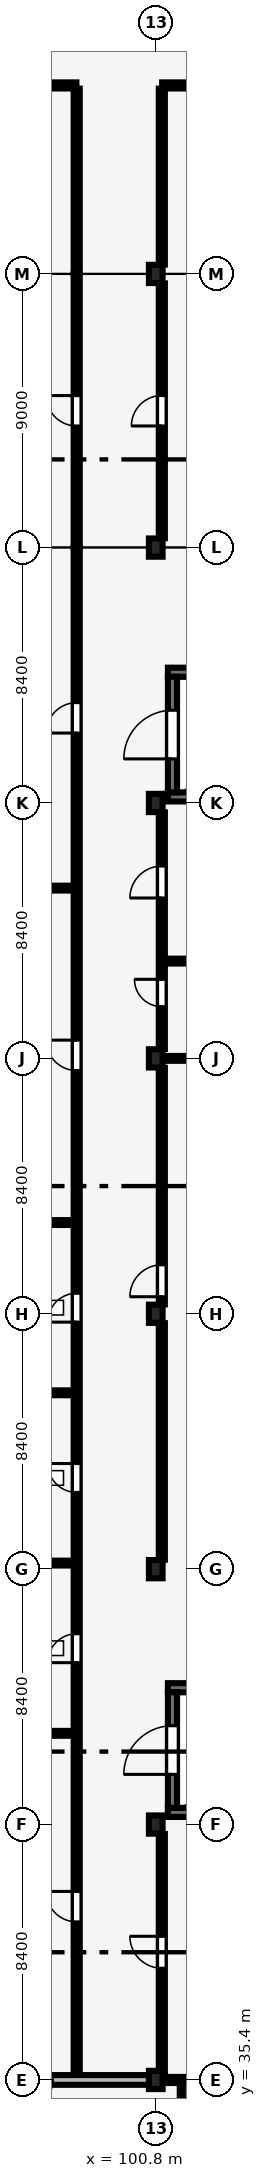
"""IFC4 building model, lengths in metres.
Left out: names, types, materials, properties, quantities, classifications, styles, units other than length and angle.
Written with IfcOpenShell. Run it as: python <this file> out.ifc"""

import sys

from ifc_helpers import new_model, si_unit, direction, frame, frame_2d, origin, origin_2d, place, context, subcontext, project, spatial, rectangle, extrude, element, fill, save


model = new_model("IFC4")
c1 = context("Model", 3, precision=1e-05, world=origin(), true_north=direction((0.0, 1.0)))
c2 = subcontext(c1, "Body", "Model", "MODEL_VIEW")
j1 = project(units=[si_unit("LENGTHUNIT", "METRE"), si_unit("PLANEANGLEUNIT", "RADIAN")], contexts=[c1])
p1 = place(None, origin())
s1 = spatial("IfcSite", under=j1, at=p1, CompositionType="ELEMENT")
p2 = place(p1, origin())
s2 = spatial("IfcBuilding", under=s1, at=p2, CompositionType="ELEMENT")
p3 = place(p2, frame((0.0, 0.0, 13.2)))
s3 = spatial("IfcBuildingStorey", under=s2, at=p3, CompositionType="ELEMENT", Elevation=13.2)
for number, where, z_axis, x_axis in (
    (1, (100.8, 35.4, 0.0), (0.0, 0.0, 1.0), (1.0, 0.0, 0.0)),
    (2, (100.8, 43.8, 0.0), (0.0, 0.0, 1.0), (1.0, 0.0, 0.0)),
    (3, (100.8, 52.2, 0.0), (0.0, 0.0, 1.0), (1.0, 0.0, 0.0)),
    (4, (100.8, 60.6, 0.0), (0.0, 0.0, 1.0), (1.0, 0.0, 0.0)),
    (5, (100.8, 69.0, 0.0), (0.0, 0.0, 1.0), (1.0, 0.0, 0.0)),
    (6, (100.8, 77.4, 0.0), (0.0, 0.0, 1.0), (1.0, 0.0, 0.0)),
    (7, (100.8, 85.8, 0.0), (0.0, 0.0, 1.0), (1.0, 0.0, 0.0)),
    (8, (100.8, 94.8, 0.0), (0.0, 0.0, 1.0), (1.0, 0.0, 0.0)),
):
    element("IfcColumn", number, at=place(p3, frame(where, z_axis=z_axis, x_axis=x_axis)), inside=s3, PredefinedType="COLUMN", context=c2, shape_type="SweptSolid", body=[
        extrude(rectangle(XDim=0.45, YDim=0.6, at=origin_2d()), origin(), (0.0, 0.0, 1.0), 4.2),
    ])
p4 = place(p3, frame((92.6, 35.4, 0.0), z_axis=(0.0, 0.0, 1.0), x_axis=(1.0, 0.0, 0.0)))
e9 = element("IfcWall", 9, at=p4, inside=s3, PredefinedType="SOLIDWALL", context=c2, shape_type="SweptSolid", body=[
    extrude(rectangle(XDim=8.0, YDim=0.32, at=frame_2d((4.0, 0.0))), origin(), (0.0, 0.0, 1.0), 3.43),
])
p5 = place(p4, frame((4.8, 0.0, 0.0), z_axis=(0.0, 0.0, 1.0), x_axis=(-1.0, 0.0, 0.0)))
e10 = element("IfcOpeningElement", 10, at=p5, cuts=e9, PredefinedType="OPENING", context=c2, shape_type="SweptSolid", body=[
    extrude(rectangle(XDim=1.6, YDim=2.3, at=frame_2d((0.8, 1.15))), frame((0.0, 0.17, 0.0), z_axis=(0.0, -1.0, 0.0), x_axis=(1.0, 0.0, 0.0)), (0.0, 0.0, 1.0), 0.34),
])
p6 = place(p4, frame((0.45, 0.0, 0.95)))
e11 = element("IfcOpeningElement", 11, at=p6, cuts=e9, PredefinedType="OPENING", context=c2, shape_type="SweptSolid", body=[
    extrude(rectangle(XDim=1.68, YDim=1.8, at=frame_2d((0.84, 0.9))), frame((0.0, 0.17, 0.0), z_axis=(0.0, -1.0, 0.0), x_axis=(1.0, 0.0, 0.0)), (0.0, 0.0, 1.0), 0.34),
])
for number, where, z_axis, x_axis in (
    (12, (101.2, 44.2, 0.0), (0.0, 0.0, 1.0), (1.0, 0.0, 0.0)),
    (13, (101.2, 48.3, 0.0), (0.0, 0.0, 1.0), (1.0, 0.0, 0.0)),
):
    element("IfcWall", number, at=place(p3, frame(where, z_axis=z_axis, x_axis=x_axis)), inside=s3, PredefinedType="SHEAR", context=c2, shape_type="SweptSolid", body=[
        extrude(rectangle(XDim=7.6, YDim=0.3, at=frame_2d((3.8, 0.0))), origin(), (0.0, 0.0, 1.0), 4.025),
    ])
p7 = place(p3, frame((101.35, 44.35, 0.0), z_axis=(0.0, 0.0, 1.0), x_axis=(0.0, 1.0, 0.0)))
e14 = element("IfcWall", 14, at=p7, inside=s3, PredefinedType="SHEAR", context=c2, shape_type="SweptSolid", body=[
    extrude(rectangle(XDim=3.8, YDim=0.3, at=frame_2d((1.9, 0.0))), origin(), (0.0, 0.0, 1.0), 4.025),
])
p8 = place(p7, frame((1.1, 0.0, 0.0)))
e15 = element("IfcOpeningElement", 15, at=p8, cuts=e14, PredefinedType="OPENING", context=c2, shape_type="SweptSolid", body=[
    extrude(rectangle(XDim=1.6, YDim=2.2, at=frame_2d((0.8, 1.1))), frame((0.0, 0.16, 0.0), z_axis=(0.0, -1.0, 0.0), x_axis=(1.0, 0.0, 0.0)), (0.0, 0.0, 1.0), 0.32),
])
for number, where, z_axis, x_axis in (
    (16, (101.2, 77.6, 0.0), (0.0, 0.0, 1.0), (1.0, 0.0, 0.0)),
    (17, (101.2, 81.7, 0.0), (0.0, 0.0, 1.0), (1.0, 0.0, 0.0)),
):
    element("IfcWall", number, at=place(p3, frame(where, z_axis=z_axis, x_axis=x_axis)), inside=s3, PredefinedType="SHEAR", context=c2, shape_type="SweptSolid", body=[
        extrude(rectangle(XDim=7.6, YDim=0.3, at=frame_2d((3.8, 0.0))), origin(), (0.0, 0.0, 1.0), 4.025),
    ])
p9 = place(p3, frame((101.35, 77.75, 0.0), z_axis=(0.0, 0.0, 1.0), x_axis=(0.0, 1.0, 0.0)))
e18 = element("IfcWall", 18, at=p9, inside=s3, PredefinedType="SHEAR", context=c2, shape_type="SweptSolid", body=[
    extrude(rectangle(XDim=3.8, YDim=0.3, at=frame_2d((1.9, 0.0))), origin(), (0.0, 0.0, 1.0), 4.025),
])
p10 = place(p9, frame((1.1, 0.0, 0.0)))
e19 = element("IfcOpeningElement", 19, at=p10, cuts=e18, PredefinedType="OPENING", context=c2, shape_type="SweptSolid", body=[
    extrude(rectangle(XDim=1.6, YDim=2.2, at=frame_2d((0.8, 1.1))), frame((0.0, 0.16, 0.0), z_axis=(0.0, -1.0, 0.0), x_axis=(1.0, 0.0, 0.0)), (0.0, 0.0, 1.0), 0.32),
])
p11 = place(p3, frame((62.31, 101.0, 0.0), z_axis=(0.0, 0.0, 1.0), x_axis=(1.0, 0.0, 0.0)))
e20 = element("IfcWall", 20, at=p11, inside=s3, PredefinedType="PARTITIONING", context=c2, shape_type="SweptSolid", body=[
    extrude(rectangle(XDim=35.88, YDim=0.2, at=frame_2d((17.94, 0.0))), origin(), (0.0, 0.0, 1.0), 3.451),
])
p12 = place(p11, frame((8.49, 0.0, 0.0)))
e21 = element("IfcOpeningElement", 21, at=p12, cuts=e20, PredefinedType="OPENING", context=c2, shape_type="SweptSolid", body=[
    extrude(rectangle(XDim=0.9, YDim=2.1, at=frame_2d((0.45, 1.05))), frame((0.0, 0.11, 0.0), z_axis=(0.0, -1.0, 0.0), x_axis=(1.0, 0.0, 0.0)), (0.0, 0.0, 1.0), 0.22),
])
p13 = place(p11, frame((26.44, 0.0, 0.0)))
e22 = element("IfcOpeningElement", 22, at=p13, cuts=e20, PredefinedType="OPENING", context=c2, shape_type="SweptSolid", body=[
    extrude(rectangle(XDim=0.9, YDim=2.1, at=frame_2d((0.45, 1.05))), frame((0.0, 0.11, 0.0), z_axis=(0.0, -1.0, 0.0), x_axis=(1.0, 0.0, 0.0)), (0.0, 0.0, 1.0), 0.22),
])
p14 = place(p3, frame((98.2, 94.81, 0.0), z_axis=(0.0, 0.0, 1.0), x_axis=(0.0, 1.0, 0.0)))
e23 = element("IfcWall", 23, at=p14, inside=s3, PredefinedType="PARTITIONING", context=c2, shape_type="SweptSolid", body=[
    extrude(rectangle(XDim=6.085, YDim=0.2, at=frame_2d((3.042, 0.0))), origin(), (0.0, 0.0, 1.0), 3.9),
])
p15 = place(p3, frame((101.01, 101.0, 0.0), z_axis=(0.0, 0.0, 1.0), x_axis=(1.0, 0.0, 0.0)))
e24 = element("IfcWall", 24, at=p15, inside=s3, PredefinedType="PARTITIONING", context=c2, shape_type="SweptSolid", body=[
    extrude(rectangle(XDim=16.395, YDim=0.2, at=frame_2d((8.198, 0.0))), origin(), (0.0, 0.0, 1.0), 3.451),
])
p16 = place(p15, frame((7.84, 0.0, 0.0)))
e25 = element("IfcOpeningElement", 25, at=p16, cuts=e24, PredefinedType="OPENING", context=c2, shape_type="SweptSolid", body=[
    extrude(rectangle(XDim=0.9, YDim=2.1, at=frame_2d((0.45, 1.05))), frame((0.0, 0.11, 0.0), z_axis=(0.0, -1.0, 0.0), x_axis=(1.0, 0.0, 0.0)), (0.0, 0.0, 1.0), 0.22),
])
p17 = place(p3, frame((101.0, 95.11, 0.0), z_axis=(0.0, 0.0, 1.0), x_axis=(0.0, 1.0, 0.0)))
e26 = element("IfcWall", 26, at=p17, inside=s3, PredefinedType="PARTITIONING", context=c2, shape_type="SweptSolid", body=[
    extrude(rectangle(XDim=5.785, YDim=0.2, at=frame_2d((2.893, 0.0))), origin(), (0.0, 0.0, 1.0), 3.48),
])
p18 = place(p3, frame((98.2, 85.81, 0.0), z_axis=(0.0, 0.0, 1.0), x_axis=(0.0, 1.0, 0.0)))
e27 = element("IfcWall", 27, at=p18, inside=s3, PredefinedType="PARTITIONING", context=c2, shape_type="SweptSolid", body=[
    extrude(rectangle(XDim=8.98, YDim=0.2, at=frame_2d((4.49, 0.0))), origin(), (0.0, 0.0, 1.0), 3.9),
])
p19 = place(p18, frame((3.99, 0.0, 0.0)))
e28 = element("IfcOpeningElement", 28, at=p19, cuts=e27, PredefinedType="OPENING", context=c2, shape_type="SweptSolid", body=[
    extrude(rectangle(XDim=1.0, YDim=2.15, at=frame_2d((0.5, 1.075))), frame((0.0, 0.11, 0.0), z_axis=(0.0, -1.0, 0.0), x_axis=(1.0, 0.0, 0.0)), (0.0, 0.0, 1.0), 0.22),
])
p20 = place(p3, frame((101.0, 86.11, 0.0), z_axis=(0.0, 0.0, 1.0), x_axis=(0.0, 1.0, 0.0)))
e29 = element("IfcWall", 29, at=p20, inside=s3, PredefinedType="PARTITIONING", context=c2, shape_type="SweptSolid", body=[
    extrude(rectangle(XDim=8.38, YDim=0.2, at=frame_2d((4.19, 0.0))), origin(), (0.0, 0.0, 1.0), 3.43),
])
p21 = place(p20, frame((3.69, 0.0, 0.0)))
e30 = element("IfcOpeningElement", 30, at=p21, cuts=e29, PredefinedType="OPENING", context=c2, shape_type="SweptSolid", body=[
    extrude(rectangle(XDim=1.0, YDim=2.15, at=frame_2d((0.5, 1.075))), frame((0.0, 0.11, 0.0), z_axis=(0.0, -1.0, 0.0), x_axis=(1.0, 0.0, 0.0)), (0.0, 0.0, 1.0), 0.22),
])
p22 = place(p3, frame((92.525, 46.8, 0.0), z_axis=(0.0, 0.0, 1.0), x_axis=(1.0, 0.0, 0.0)))
e31 = element("IfcWall", 31, at=p22, inside=s3, PredefinedType="PARTITIONING", context=c2, shape_type="SweptSolid", body=[
    extrude(rectangle(XDim=5.57, YDim=0.16, at=frame_2d((2.785, 0.0))), origin(), (0.0, 0.0, 1.0), 3.46),
])
p23 = place(p3, frame((92.525, 52.4, 0.0), z_axis=(0.0, 0.0, 1.0), x_axis=(1.0, 0.0, 0.0)))
e32 = element("IfcWall", 32, at=p23, inside=s3, PredefinedType="PARTITIONING", context=c2, shape_type="SweptSolid", body=[
    extrude(rectangle(XDim=5.57, YDim=0.16, at=frame_2d((2.785, 0.0))), origin(), (0.0, 0.0, 1.0), 3.14),
])
for number, where, z_axis, x_axis in (
    (33, (92.525, 58.0, 0.0), (0.0, 0.0, 1.0), (1.0, 0.0, 0.0)),
    (34, (92.525, 63.6, 0.0), (0.0, 0.0, 1.0), (1.0, 0.0, 0.0)),
    (35, (92.525, 74.6, 0.0), (0.0, 0.0, 1.0), (1.0, 0.0, 0.0)),
):
    element("IfcWall", number, at=place(p3, frame(where, z_axis=z_axis, x_axis=x_axis)), inside=s3, PredefinedType="PARTITIONING", context=c2, shape_type="SweptSolid", body=[
        extrude(rectangle(XDim=5.57, YDim=0.16, at=frame_2d((2.785, 0.0))), origin(), (0.0, 0.0, 1.0), 3.46),
    ])
p24 = place(p3, frame((98.2, 35.565, 0.0), z_axis=(0.0, 0.0, 1.0), x_axis=(0.0, 1.0, 0.0)))
e36 = element("IfcWall", 36, at=p24, inside=s3, PredefinedType="PARTITIONING", context=c2, shape_type="SweptSolid", body=[
    extrude(rectangle(XDim=50.225, YDim=0.2, at=frame_2d((25.113, 0.0))), origin(), (0.0, 0.0, 1.0), 3.9),
])
p25 = place(p24, frame((5.035, 0.0, 0.0)))
e37 = element("IfcOpeningElement", 37, at=p25, cuts=e36, PredefinedType="OPENING", context=c2, shape_type="SweptSolid", body=[
    extrude(rectangle(XDim=1.0, YDim=2.15, at=frame_2d((0.5, 1.075))), frame((0.0, 0.11, 0.0), z_axis=(0.0, -1.0, 0.0), x_axis=(1.0, 0.0, 0.0)), (0.0, 0.0, 1.0), 0.22),
])
p26 = place(p24, frame((13.56, 0.0, 0.0)))
e38 = element("IfcOpeningElement", 38, at=p26, cuts=e36, PredefinedType="OPENING", context=c2, shape_type="SweptSolid", body=[
    extrude(rectangle(XDim=0.95, YDim=2.2, at=frame_2d((0.475, 1.1))), frame((0.0, 0.11, 0.0), z_axis=(0.0, -1.0, 0.0), x_axis=(1.0, 0.0, 0.0)), (0.0, 0.0, 1.0), 0.22),
])
p27 = place(p24, frame((19.16, 0.0, 0.0)))
e39 = element("IfcOpeningElement", 39, at=p27, cuts=e36, PredefinedType="OPENING", context=c2, shape_type="SweptSolid", body=[
    extrude(rectangle(XDim=0.95, YDim=2.2, at=frame_2d((0.475, 1.1))), frame((0.0, 0.11, 0.0), z_axis=(0.0, -1.0, 0.0), x_axis=(1.0, 0.0, 0.0)), (0.0, 0.0, 1.0), 0.22),
])
p28 = place(p24, frame((24.76, 0.0, 0.0)))
e40 = element("IfcOpeningElement", 40, at=p28, cuts=e36, PredefinedType="OPENING", context=c2, shape_type="SweptSolid", body=[
    extrude(rectangle(XDim=0.95, YDim=2.1, at=frame_2d((0.475, 1.05))), frame((0.0, 0.11, 0.0), z_axis=(0.0, -1.0, 0.0), x_axis=(1.0, 0.0, 0.0)), (0.0, 0.0, 1.0), 0.22),
])
p29 = place(p24, frame((33.035, 0.0, 0.0)))
e41 = element("IfcOpeningElement", 41, at=p29, cuts=e36, PredefinedType="OPENING", context=c2, shape_type="SweptSolid", body=[
    extrude(rectangle(XDim=1.0, YDim=2.15, at=frame_2d((0.5, 1.075))), frame((0.0, 0.11, 0.0), z_axis=(0.0, -1.0, 0.0), x_axis=(1.0, 0.0, 0.0)), (0.0, 0.0, 1.0), 0.22),
])
p30 = place(p24, frame((44.135, 0.0, 0.0)))
e42 = element("IfcOpeningElement", 42, at=p30, cuts=e36, PredefinedType="OPENING", context=c2, shape_type="SweptSolid", body=[
    extrude(rectangle(XDim=1.0, YDim=2.15, at=frame_2d((0.5, 1.075))), frame((0.0, 0.11, 0.0), z_axis=(0.0, -1.0, 0.0), x_axis=(1.0, 0.0, 0.0)), (0.0, 0.0, 1.0), 0.22),
])
p31 = place(p3, frame((101.0, 35.565, 0.0), z_axis=(0.0, 0.0, 1.0), x_axis=(0.0, 1.0, 0.0)))
e43 = element("IfcWall", 43, at=p31, inside=s3, PredefinedType="PARTITIONING", context=c2, shape_type="SweptSolid", body=[
    extrude(rectangle(XDim=7.925, YDim=0.2, at=frame_2d((3.962, 0.0))), origin(), (0.0, 0.0, 1.0), 3.43),
])
p32 = place(p31, frame((3.51, 0.0, 0.0)))
e44 = element("IfcOpeningElement", 44, at=p32, cuts=e43, PredefinedType="OPENING", context=c2, shape_type="SweptSolid", body=[
    extrude(rectangle(XDim=1.05, YDim=2.2, at=frame_2d((0.525, 1.1))), frame((0.0, 0.11, 0.0), z_axis=(0.0, -1.0, 0.0), x_axis=(1.0, 0.0, 0.0)), (0.0, 0.0, 1.0), 0.22),
])
p33 = place(p3, frame((101.105, 69.0, 0.0), z_axis=(0.0, 0.0, 1.0), x_axis=(1.0, 0.0, 0.0)))
e45 = element("IfcWall", 45, at=p33, inside=s3, PredefinedType="PARTITIONING", context=c2, shape_type="SweptSolid", body=[
    extrude(rectangle(XDim=7.99, YDim=0.16, at=frame_2d((3.995, 0.0))), origin(), (0.0, 0.0, 1.0), 3.34),
])
p34 = place(p3, frame((101.105, 72.2, 0.0), z_axis=(0.0, 0.0, 1.0), x_axis=(1.0, 0.0, 0.0)))
e46 = element("IfcWall", 46, at=p34, inside=s3, PredefinedType="PARTITIONING", context=c2, shape_type="SweptSolid", body=[
    extrude(rectangle(XDim=7.99, YDim=0.16, at=frame_2d((3.995, 0.0))), origin(), (0.0, 0.0, 1.0), 3.9),
])
p35 = place(p3, frame((101.0, 52.51, 0.0), z_axis=(0.0, 0.0, 1.0), x_axis=(0.0, 1.0, 0.0)))
e47 = element("IfcWall", 47, at=p35, inside=s3, PredefinedType="PARTITIONING", context=c2, shape_type="SweptSolid", body=[
    extrude(rectangle(XDim=7.78, YDim=0.2, at=frame_2d((3.89, 0.0))), origin(), (0.0, 0.0, 1.0), 3.24),
])
p36 = place(p3, frame((101.0, 60.91, 0.0), z_axis=(0.0, 0.0, 1.0), x_axis=(0.0, 1.0, 0.0)))
e48 = element("IfcWall", 48, at=p36, inside=s3, PredefinedType="PARTITIONING", context=c2, shape_type="SweptSolid", body=[
    extrude(rectangle(XDim=7.78, YDim=0.2, at=frame_2d((3.89, 0.0))), origin(), (0.0, 0.0, 1.0), 3.29),
])
p37 = place(p36, frame((0.25, 0.0, 0.0)))
e49 = element("IfcOpeningElement", 49, at=p37, cuts=e48, PredefinedType="OPENING", context=c2, shape_type="SweptSolid", body=[
    extrude(rectangle(XDim=1.05, YDim=2.2, at=frame_2d((0.525, 1.1))), frame((0.0, 0.11, 0.0), z_axis=(0.0, -1.0, 0.0), x_axis=(1.0, 0.0, 0.0)), (0.0, 0.0, 1.0), 0.22),
])
p38 = place(p3, frame((101.0, 69.31, 0.0), z_axis=(0.0, 0.0, 1.0), x_axis=(0.0, 1.0, 0.0)))
e50 = element("IfcWall", 50, at=p38, inside=s3, PredefinedType="PARTITIONING", context=c2, shape_type="SweptSolid", body=[
    extrude(rectangle(XDim=7.78, YDim=0.2, at=frame_2d((3.89, 0.0))), origin(), (0.0, 0.0, 1.0), 3.24),
])
p39 = place(p38, frame((1.39, 0.0, 0.0)))
e51 = element("IfcOpeningElement", 51, at=p39, cuts=e50, PredefinedType="OPENING", context=c2, shape_type="SweptSolid", body=[
    extrude(rectangle(XDim=0.9, YDim=2.1, at=frame_2d((0.45, 1.05))), frame((0.0, 0.11, 0.0), z_axis=(0.0, -1.0, 0.0), x_axis=(1.0, 0.0, 0.0)), (0.0, 0.0, 1.0), 0.22),
])
p40 = place(p38, frame((4.965, 0.0, 0.0)))
e52 = element("IfcOpeningElement", 52, at=p40, cuts=e50, PredefinedType="OPENING", context=c2, shape_type="SweptSolid", body=[
    extrude(rectangle(XDim=1.05, YDim=2.2, at=frame_2d((0.525, 1.1))), frame((0.0, 0.11, 0.0), z_axis=(0.0, -1.0, 0.0), x_axis=(1.0, 0.0, 0.0)), (0.0, 0.0, 1.0), 0.22),
])
p41 = place(p5, origin())
e53 = element("IfcDoor", 53, at=p41, inside=s3, OperationType="DOUBLE_DOOR_SINGLE_SWING", PredefinedType="DOOR", context=c2, shape_type="SweptSolid", body=[
    extrude(rectangle(XDim=1.6, YDim=2.3, at=frame_2d((0.8, 1.15))), frame((0.0, 0.025, 0.0), z_axis=(0.0, -1.0, 0.0), x_axis=(1.0, 0.0, 0.0)), (0.0, 0.0, 1.0), 0.05),
])
fill(e10, e53)
p42 = place(p8, origin())
e54 = element("IfcDoor", 54, at=p42, inside=s3, OperationType="DOUBLE_DOOR_SINGLE_SWING", PredefinedType="DOOR", context=c2, shape_type="SweptSolid", body=[
    extrude(rectangle(XDim=1.6, YDim=2.2, at=frame_2d((0.8, 1.1))), frame((0.0, 0.025, 0.0), z_axis=(0.0, -1.0, 0.0), x_axis=(1.0, 0.0, 0.0)), (0.0, 0.0, 1.0), 0.05),
])
fill(e15, e54)
p43 = place(p10, origin())
e55 = element("IfcDoor", 55, at=p43, inside=s3, OperationType="DOUBLE_DOOR_SINGLE_SWING", PredefinedType="DOOR", context=c2, shape_type="SweptSolid", body=[
    extrude(rectangle(XDim=1.6, YDim=2.2, at=frame_2d((0.8, 1.1))), frame((0.0, 0.025, 0.0), z_axis=(0.0, -1.0, 0.0), x_axis=(1.0, 0.0, 0.0)), (0.0, 0.0, 1.0), 0.05),
])
fill(e19, e55)
p44 = place(p19, origin())
e56 = element("IfcDoor", 56, at=p44, inside=s3, OperationType="SINGLE_SWING_RIGHT", PredefinedType="DOOR", context=c2, shape_type="SweptSolid", body=[
    extrude(rectangle(XDim=1.0, YDim=2.15, at=frame_2d((0.5, 1.075))), frame((0.0, 0.025, 0.0), z_axis=(0.0, -1.0, 0.0), x_axis=(1.0, 0.0, 0.0)), (0.0, 0.0, 1.0), 0.05),
])
fill(e28, e56)
p45 = place(p21, origin())
e57 = element("IfcDoor", 57, at=p45, inside=s3, OperationType="SINGLE_SWING_LEFT", PredefinedType="DOOR", context=c2, shape_type="SweptSolid", body=[
    extrude(rectangle(XDim=1.0, YDim=2.15, at=frame_2d((0.5, 1.075))), frame((0.0, 0.025, 0.0), z_axis=(0.0, -1.0, 0.0), x_axis=(1.0, 0.0, 0.0)), (0.0, 0.0, 1.0), 0.05),
])
fill(e30, e57)
p46 = place(p25, origin())
e58 = element("IfcDoor", 58, at=p46, inside=s3, OperationType="SINGLE_SWING_RIGHT", PredefinedType="DOOR", context=c2, shape_type="SweptSolid", body=[
    extrude(rectangle(XDim=1.0, YDim=2.15, at=frame_2d((0.5, 1.075))), frame((0.0, 0.025, 0.0), z_axis=(0.0, -1.0, 0.0), x_axis=(1.0, 0.0, 0.0)), (0.0, 0.0, 1.0), 0.05),
])
fill(e37, e58)
p47 = place(p26, origin())
e59 = element("IfcDoor", 59, at=p47, inside=s3, OperationType="SINGLE_SWING_LEFT", PredefinedType="DOOR", context=c2, shape_type="SweptSolid", body=[
    extrude(rectangle(XDim=0.95, YDim=2.2, at=frame_2d((0.475, 1.1))), frame((0.0, 0.025, 0.0), z_axis=(0.0, -1.0, 0.0), x_axis=(1.0, 0.0, 0.0)), (0.0, 0.0, 1.0), 0.05),
])
fill(e38, e59)
p48 = place(p27, origin())
e60 = element("IfcDoor", 60, at=p48, inside=s3, OperationType="SINGLE_SWING_RIGHT", PredefinedType="DOOR", context=c2, shape_type="SweptSolid", body=[
    extrude(rectangle(XDim=0.95, YDim=2.2, at=frame_2d((0.475, 1.1))), frame((0.0, 0.025, 0.0), z_axis=(0.0, -1.0, 0.0), x_axis=(1.0, 0.0, 0.0)), (0.0, 0.0, 1.0), 0.05),
])
fill(e39, e60)
p49 = place(p28, origin())
e61 = element("IfcDoor", 61, at=p49, inside=s3, OperationType="SINGLE_SWING_LEFT", PredefinedType="DOOR", context=c2, shape_type="SweptSolid", body=[
    extrude(rectangle(XDim=0.95, YDim=2.1, at=frame_2d((0.475, 1.05))), frame((0.0, 0.025, 0.0), z_axis=(0.0, -1.0, 0.0), x_axis=(1.0, 0.0, 0.0)), (0.0, 0.0, 1.0), 0.05),
])
fill(e40, e61)
p50 = place(p29, origin())
e62 = element("IfcDoor", 62, at=p50, inside=s3, OperationType="SINGLE_SWING_RIGHT", PredefinedType="DOOR", context=c2, shape_type="SweptSolid", body=[
    extrude(rectangle(XDim=1.0, YDim=2.15, at=frame_2d((0.5, 1.075))), frame((0.0, 0.025, 0.0), z_axis=(0.0, -1.0, 0.0), x_axis=(1.0, 0.0, 0.0)), (0.0, 0.0, 1.0), 0.05),
])
fill(e41, e62)
p51 = place(p30, origin())
e63 = element("IfcDoor", 63, at=p51, inside=s3, OperationType="SINGLE_SWING_LEFT", PredefinedType="DOOR", context=c2, shape_type="SweptSolid", body=[
    extrude(rectangle(XDim=1.0, YDim=2.15, at=frame_2d((0.5, 1.075))), frame((0.0, 0.025, 0.0), z_axis=(0.0, -1.0, 0.0), x_axis=(1.0, 0.0, 0.0)), (0.0, 0.0, 1.0), 0.05),
])
fill(e42, e63)
p52 = place(p32, origin())
e64 = element("IfcDoor", 64, at=p52, inside=s3, OperationType="SINGLE_SWING_RIGHT", PredefinedType="DOOR", context=c2, shape_type="SweptSolid", body=[
    extrude(rectangle(XDim=1.05, YDim=2.2, at=frame_2d((0.525, 1.1))), frame((0.0, 0.025, 0.0), z_axis=(0.0, -1.0, 0.0), x_axis=(1.0, 0.0, 0.0)), (0.0, 0.0, 1.0), 0.05),
])
fill(e44, e64)
p53 = place(p37, origin())
e65 = element("IfcDoor", 65, at=p53, inside=s3, OperationType="SINGLE_SWING_LEFT", PredefinedType="DOOR", context=c2, shape_type="SweptSolid", body=[
    extrude(rectangle(XDim=1.05, YDim=2.2, at=frame_2d((0.525, 1.1))), frame((0.0, 0.025, 0.0), z_axis=(0.0, -1.0, 0.0), x_axis=(1.0, 0.0, 0.0)), (0.0, 0.0, 1.0), 0.05),
])
fill(e49, e65)
p54 = place(p39, origin())
e66 = element("IfcDoor", 66, at=p54, inside=s3, OperationType="SINGLE_SWING_RIGHT", PredefinedType="DOOR", context=c2, shape_type="SweptSolid", body=[
    extrude(rectangle(XDim=0.9, YDim=2.1, at=frame_2d((0.45, 1.05))), frame((0.0, 0.025, 0.0), z_axis=(0.0, -1.0, 0.0), x_axis=(1.0, 0.0, 0.0)), (0.0, 0.0, 1.0), 0.05),
])
fill(e51, e66)
p55 = place(p40, origin())
e67 = element("IfcDoor", 67, at=p55, inside=s3, OperationType="SINGLE_SWING_LEFT", PredefinedType="DOOR", context=c2, shape_type="SweptSolid", body=[
    extrude(rectangle(XDim=1.05, YDim=2.2, at=frame_2d((0.525, 1.1))), frame((0.0, 0.025, 0.0), z_axis=(0.0, -1.0, 0.0), x_axis=(1.0, 0.0, 0.0)), (0.0, 0.0, 1.0), 0.05),
])
fill(e52, e67)
save(model, sys.argv[1])
